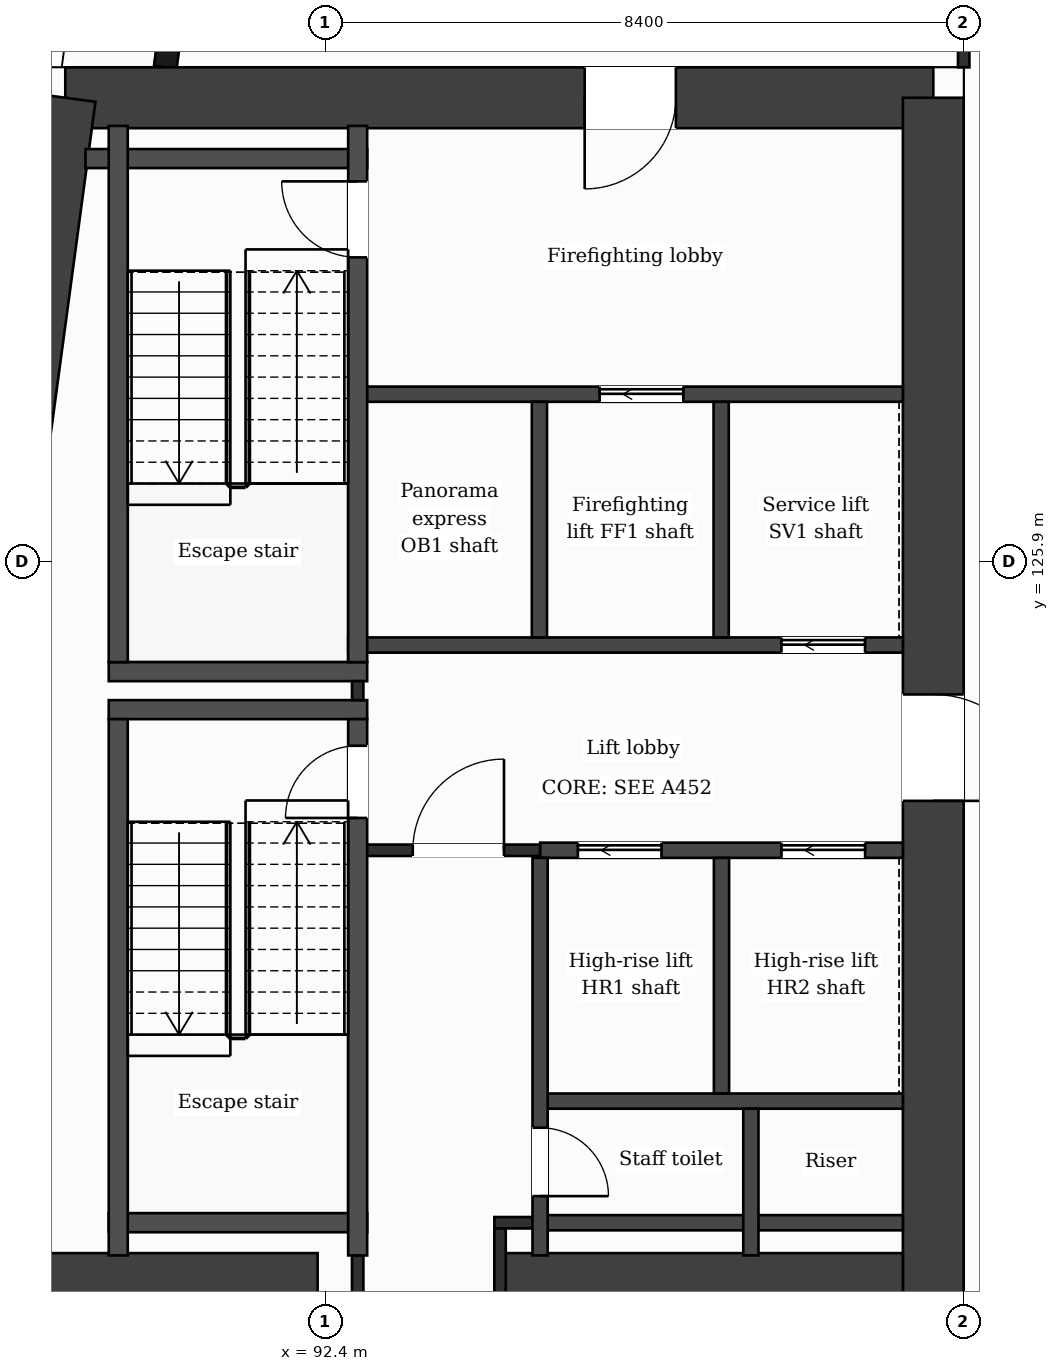
"""IFC4 building model, lengths in metres.
Left out: names, types, materials, properties, quantities, classifications, styles, units other than length and angle.
Written with IfcOpenShell. Run it as: python <this file> out.ifc"""

import sys

from ifc_helpers import new_model, si_unit, direction, frame, frame_2d, origin, place, context, subcontext, project, spatial, rectangle, extrude, element, fill, save


model = new_model("IFC4")
c1 = context("Model", 3, precision=1e-05, world=origin(), true_north=direction((0.0, 1.0)))
c2 = subcontext(c1, "Body", "Model", "MODEL_VIEW")
j1 = project(units=[si_unit("LENGTHUNIT", "METRE"), si_unit("PLANEANGLEUNIT", "RADIAN")], contexts=[c1])
p1 = place(None, origin())
s1 = spatial("IfcSite", under=j1, at=p1, CompositionType="ELEMENT")
p2 = place(p1, origin())
s2 = spatial("IfcBuilding", under=s1, at=p2, CompositionType="ELEMENT")
p3 = place(p2, frame((0.0, 0.0, 213.3)))
s3 = spatial("IfcBuildingStorey", under=s2, at=p3, CompositionType="ELEMENT", Elevation=213.3)
p4 = place(p3, frame((88.98, 132.0, 0.0), z_axis=(0.0, 0.0, 1.0), x_axis=(1.0, 0.0, 0.0)))
e1 = element("IfcWall", 1, at=p4, inside=s3, PredefinedType="SHEAR", context=c2, shape_type="SweptSolid", body=[
    extrude(rectangle(XDim=11.419, YDim=0.8, at=frame_2d((5.71, 0.0))), origin(), (0.0, 0.0, 1.0), 3.7),
])
p5 = place(p4, frame((6.833, 0.0, 0.0)))
e2 = element("IfcOpeningElement", 2, at=p5, cuts=e1, PredefinedType="OPENING", context=c2, shape_type="SweptSolid", body=[
    extrude(rectangle(XDim=1.2, YDim=2.1, at=frame_2d((0.6, 1.05))), frame((0.0, 0.41, 0.0), z_axis=(0.0, -1.0, 0.0), x_axis=(1.0, 0.0, 0.0)), (0.0, 0.0, 1.0), 0.82),
])
p6 = place(p3, frame((100.4, 132.0, 0.0), z_axis=(0.0, 0.0, 1.0), x_axis=(0.0, -1.0, 0.0)))
e3 = element("IfcWall", 3, at=p6, inside=s3, PredefinedType="SHEAR", context=c2, shape_type="SweptSolid", body=[
    extrude(rectangle(XDim=21.2, YDim=0.8, at=frame_2d((10.6, 0.0))), origin(), (0.0, 0.0, 1.0), 3.7),
])
p7 = place(p6, frame((7.85, 0.0, 0.0)))
e4 = element("IfcOpeningElement", 4, at=p7, cuts=e3, PredefinedType="OPENING", context=c2, shape_type="SweptSolid", body=[
    extrude(rectangle(XDim=1.4, YDim=2.1, at=frame_2d((0.7, 1.05))), frame((0.0, 0.41, 0.0), z_axis=(0.0, -1.0, 0.0), x_axis=(1.0, 0.0, 0.0)), (0.0, 0.0, 1.0), 0.82),
])
p8 = place(p3, frame((86.127, 110.8, 0.0), z_axis=(0.0, 0.0, 1.0), x_axis=(0.133408347329, 0.991061154956, 0.0)))
e5 = element("IfcWall", 5, at=p8, inside=s3, PredefinedType="SHEAR", context=c2, shape_type="SweptSolid", body=[
    extrude(rectangle(XDim=21.391, YDim=0.8, at=frame_2d((10.696, 0.0))), origin(), (0.0, 0.0, 1.0), 3.7),
])
p9 = place(p3, frame((87.223, 116.4, 0.0), z_axis=(0.0, 0.0, 1.0), x_axis=(1.0, 0.0, 0.0)))
e6 = element("IfcWall", 6, at=p9, inside=s3, PredefinedType="SHEAR", context=c2, shape_type="SweptSolid", body=[
    extrude(rectangle(XDim=5.077, YDim=0.8, at=frame_2d((2.539, 0.0))), origin(), (0.0, 0.0, 1.0), 3.7),
])
p10 = place(p3, frame((94.7, 116.4, 0.0), z_axis=(0.0, 0.0, 1.0), x_axis=(1.0, 0.0, 0.0)))
e7 = element("IfcWall", 7, at=p10, inside=s3, PredefinedType="SHEAR", context=c2, shape_type="SweptSolid", body=[
    extrude(rectangle(XDim=5.3, YDim=0.8, at=frame_2d((2.65, 0.0))), origin(), (0.0, 0.0, 1.0), 3.7),
])
p11 = place(p3, frame((91.177, 138.95, 0.0), z_axis=(0.0, 0.0, 1.0), x_axis=(-0.133426664613, -0.991058689065, 0.0)))
e8 = element("IfcWall", 8, at=p11, inside=s3, PredefinedType="SOLIDWALL", context=c2, shape_type="SweptSolid", body=[
    extrude(rectangle(XDim=6.609, YDim=0.3, at=frame_2d((3.305, 0.0))), origin(), (0.0, 0.0, 1.0), 3.38),
])
p12 = place(p11, frame((1.039, 0.0, 0.9)))
e9 = element("IfcOpeningElement", 9, at=p12, cuts=e8, PredefinedType="OPENING", context=c2, shape_type="SweptSolid", body=[
    extrude(rectangle(XDim=1.2, YDim=2.1, at=frame_2d((0.6, 1.05))), frame((0.0, 0.16, 0.0), z_axis=(0.0, -1.0, 0.0), x_axis=(1.0, 0.0, 0.0)), (0.0, 0.0, 1.0), 0.32),
])
p13 = place(p11, frame((4.294, 0.0, 0.0)))
e10 = element("IfcOpeningElement", 10, at=p13, cuts=e8, PredefinedType="OPENING", context=c2, shape_type="SweptSolid", body=[
    extrude(rectangle(XDim=1.2, YDim=2.4, at=frame_2d((0.6, 1.2))), frame((0.0, 0.16, 0.0), z_axis=(0.0, -1.0, 0.0), x_axis=(1.0, 0.0, 0.0)), (0.0, 0.0, 1.0), 0.32),
])
p14 = place(p3, frame((95.227, 117.2, 0.0), z_axis=(0.0, 0.0, 1.0), x_axis=(1.0, 0.0, 0.0)))
e11 = element("IfcWall", 11, at=p14, inside=s3, PredefinedType="PARTITIONING", context=c2, shape_type="SweptSolid", body=[
    extrude(rectangle(XDim=4.773, YDim=0.2, at=frame_2d((2.386, 0.0))), origin(), (0.0, 0.0, 1.0), 3.38),
])
p15 = place(p3, frame((94.625, 117.2, 0.0), z_axis=(0.0, 0.0, 1.0), x_axis=(1.0, 0.0, 0.0)))
e12 = element("IfcWall", 12, at=p15, inside=s3, PredefinedType="PARTITIONING", context=c2, shape_type="SweptSolid", body=[
    extrude(rectangle(XDim=0.602, YDim=0.15, at=frame_2d((0.301, 0.0))), origin(), (0.0, 0.0, 1.0), 3.38),
])
p16 = place(p3, frame((89.552, 117.2, 0.0), z_axis=(0.0, 0.0, 1.0), x_axis=(1.0, 0.0, 0.0)))
e13 = element("IfcWall", 13, at=p16, inside=s3, PredefinedType="PARTITIONING", context=c2, shape_type="SweptSolid", body=[
    extrude(rectangle(XDim=3.4, YDim=0.25, at=frame_2d((1.7, 0.0))), origin(), (0.0, 0.0, 1.0), 3.38),
])
p17 = place(p3, frame((95.227, 118.8, 0.0), z_axis=(0.0, 0.0, 1.0), x_axis=(1.0, 0.0, 0.0)))
e14 = element("IfcWall", 14, at=p17, inside=s3, PredefinedType="PARTITIONING", context=c2, shape_type="SweptSolid", body=[
    extrude(rectangle(XDim=4.773, YDim=0.2, at=frame_2d((2.386, 0.0))), origin(), (0.0, 0.0, 1.0), 3.38),
])
p18 = place(p3, frame((95.227, 122.1, 0.0), z_axis=(0.0, 0.0, 1.0), x_axis=(1.0, 0.0, 0.0)))
e15 = element("IfcWall", 15, at=p18, inside=s3, PredefinedType="PARTITIONING", context=c2, shape_type="SweptSolid", body=[
    extrude(rectangle(XDim=4.773, YDim=0.2, at=frame_2d((2.386, 0.0))), origin(), (0.0, 0.0, 1.0), 3.38),
])
p19 = place(p18, frame((0.497, 0.0, 0.0)))
e16 = element("IfcOpeningElement", 16, at=p19, cuts=e15, PredefinedType="OPENING", context=c2, shape_type="SweptSolid", body=[
    extrude(rectangle(XDim=1.1, YDim=2.1, at=frame_2d((0.55, 1.05))), frame((0.0, 0.11, 0.0), z_axis=(0.0, -1.0, 0.0), x_axis=(1.0, 0.0, 0.0)), (0.0, 0.0, 1.0), 0.22),
])
p20 = place(p18, frame((3.176, 0.0, 0.0)))
e17 = element("IfcOpeningElement", 17, at=p20, cuts=e15, PredefinedType="OPENING", context=c2, shape_type="SweptSolid", body=[
    extrude(rectangle(XDim=1.1, YDim=2.1, at=frame_2d((0.55, 1.05))), frame((0.0, 0.11, 0.0), z_axis=(0.0, -1.0, 0.0), x_axis=(1.0, 0.0, 0.0)), (0.0, 0.0, 1.0), 0.22),
])
p21 = place(p3, frame((92.827, 122.1, 0.0), z_axis=(0.0, 0.0, 1.0), x_axis=(1.0, 0.0, 0.0)))
e18 = element("IfcWall", 18, at=p21, inside=s3, PredefinedType="PARTITIONING", context=c2, shape_type="SweptSolid", body=[
    extrude(rectangle(XDim=2.4, YDim=0.15, at=frame_2d((1.2, 0.0))), origin(), (0.0, 0.0, 1.0), 3.38),
])
p22 = place(p21, frame((0.725, 0.0, 0.0)))
e19 = element("IfcOpeningElement", 19, at=p22, cuts=e18, PredefinedType="OPENING", context=c2, shape_type="SweptSolid", body=[
    extrude(rectangle(XDim=1.2, YDim=2.1, at=frame_2d((0.6, 1.05))), frame((0.0, 0.085, 0.0), z_axis=(0.0, -1.0, 0.0), x_axis=(1.0, 0.0, 0.0)), (0.0, 0.0, 1.0), 0.17),
])
for number, where, z_axis, x_axis in (
    (20, (89.552, 123.95, 0.0), (0.0, 0.0, 1.0), (1.0, 0.0, 0.0)),
    (21, (89.552, 124.45, 0.0), (0.0, 0.0, 1.0), (1.0, 0.0, 0.0)),
):
    element("IfcWall", number, at=place(p3, frame(where, z_axis=z_axis, x_axis=x_axis)), inside=s3, PredefinedType="PARTITIONING", context=c2, shape_type="SweptSolid", body=[
        extrude(rectangle(XDim=3.4, YDim=0.25, at=frame_2d((1.7, 0.0))), origin(), (0.0, 0.0, 1.0), 3.38),
    ])
p23 = place(p3, frame((92.702, 124.8, 0.0), z_axis=(0.0, 0.0, 1.0), x_axis=(1.0, 0.0, 0.0)))
e22 = element("IfcWall", 22, at=p23, inside=s3, PredefinedType="PARTITIONING", context=c2, shape_type="SweptSolid", body=[
    extrude(rectangle(XDim=7.298, YDim=0.2, at=frame_2d((3.649, 0.0))), origin(), (0.0, 0.0, 1.0), 3.38),
])
p24 = place(p23, frame((5.7, 0.0, 0.0)))
e23 = element("IfcOpeningElement", 23, at=p24, cuts=e22, PredefinedType="OPENING", context=c2, shape_type="SweptSolid", body=[
    extrude(rectangle(XDim=1.1, YDim=2.1, at=frame_2d((0.55, 1.05))), frame((0.0, 0.11, 0.0), z_axis=(0.0, -1.0, 0.0), x_axis=(1.0, 0.0, 0.0)), (0.0, 0.0, 1.0), 0.22),
])
p25 = place(p3, frame((92.827, 128.1, 0.0), z_axis=(0.0, 0.0, 1.0), x_axis=(1.0, 0.0, 0.0)))
e24 = element("IfcWall", 24, at=p25, inside=s3, PredefinedType="PARTITIONING", context=c2, shape_type="SweptSolid", body=[
    extrude(rectangle(XDim=7.173, YDim=0.2, at=frame_2d((3.586, 0.0))), origin(), (0.0, 0.0, 1.0), 3.38),
])
p26 = place(p25, frame((3.184, 0.0, 0.0)))
e25 = element("IfcOpeningElement", 25, at=p26, cuts=e24, PredefinedType="OPENING", context=c2, shape_type="SweptSolid", body=[
    extrude(rectangle(XDim=1.1, YDim=2.1, at=frame_2d((0.55, 1.05))), frame((0.0, 0.11, 0.0), z_axis=(0.0, -1.0, 0.0), x_axis=(1.0, 0.0, 0.0)), (0.0, 0.0, 1.0), 0.22),
])
p27 = place(p3, frame((89.246, 131.2, 0.0), z_axis=(0.0, 0.0, 1.0), x_axis=(1.0, 0.0, 0.0)))
e26 = element("IfcWall", 26, at=p27, inside=s3, PredefinedType="PARTITIONING", context=c2, shape_type="SweptSolid", body=[
    extrude(rectangle(XDim=3.706, YDim=0.25, at=frame_2d((1.853, 0.0))), origin(), (0.0, 0.0, 1.0), 3.38),
])
for number, where, z_axis, x_axis in (
    (27, (89.677, 116.77, 0.0), (0.0, 0.0, 1.0), (0.0, 1.0, 0.0)),
    (28, (89.677, 124.575, 0.0), (0.0, 0.0, 1.0), (0.0, 1.0, 0.0)),
):
    element("IfcWall", number, at=place(p3, frame(where, z_axis=z_axis, x_axis=x_axis)), inside=s3, PredefinedType="PARTITIONING", context=c2, shape_type="SweptSolid", body=[
        extrude(rectangle(XDim=7.055, YDim=0.25, at=frame_2d((3.527, 0.0))), origin(), (0.0, 0.0, 1.0), 3.38),
    ])
p28 = place(p3, frame((92.827, 116.0, 0.0), z_axis=(0.0, 0.0, 1.0), x_axis=(0.0, 1.0, 0.0)))
e29 = element("IfcWall", 29, at=p28, inside=s3, PredefinedType="PARTITIONING", context=c2, shape_type="SweptSolid", body=[
    extrude(rectangle(XDim=0.77, YDim=0.15, at=frame_2d((0.385, 0.0))), origin(), (0.0, 0.0, 1.0), 3.38),
])
p29 = place(p3, frame((92.827, 124.075, 0.0), z_axis=(0.0, 0.0, 1.0), x_axis=(0.0, 1.0, 0.0)))
e30 = element("IfcWall", 30, at=p29, inside=s3, PredefinedType="PARTITIONING", context=c2, shape_type="SweptSolid", body=[
    extrude(rectangle(XDim=0.25, YDim=0.15, at=frame_2d((0.125, 0.0))), origin(), (0.0, 0.0, 1.0), 3.38),
])
p30 = place(p3, frame((92.827, 116.77, 0.0), z_axis=(0.0, 0.0, 1.0), x_axis=(0.0, 1.0, 0.0)))
e31 = element("IfcWall", 31, at=p30, inside=s3, PredefinedType="PARTITIONING", context=c2, shape_type="SweptSolid", body=[
    extrude(rectangle(XDim=7.055, YDim=0.25, at=frame_2d((3.527, 0.0))), origin(), (0.0, 0.0, 1.0), 3.38),
])
p31 = place(p30, frame((5.755, 0.0, 0.0)))
e32 = element("IfcOpeningElement", 32, at=p31, cuts=e31, PredefinedType="OPENING", context=c2, shape_type="SweptSolid", body=[
    extrude(rectangle(XDim=0.95, YDim=2.1, at=frame_2d((0.475, 1.05))), frame((0.0, 0.135, 0.0), z_axis=(0.0, -1.0, 0.0), x_axis=(1.0, 0.0, 0.0)), (0.0, 0.0, 1.0), 0.27),
])
p32 = place(p3, frame((92.827, 124.575, 0.0), z_axis=(0.0, 0.0, 1.0), x_axis=(0.0, 1.0, 0.0)))
e33 = element("IfcWall", 33, at=p32, inside=s3, PredefinedType="PARTITIONING", context=c2, shape_type="SweptSolid", body=[
    extrude(rectangle(XDim=7.055, YDim=0.25, at=frame_2d((3.527, 0.0))), origin(), (0.0, 0.0, 1.0), 3.38),
])
p33 = place(p32, frame((5.325, 0.0, 0.0)))
e34 = element("IfcOpeningElement", 34, at=p33, cuts=e33, PredefinedType="OPENING", context=c2, shape_type="SweptSolid", body=[
    extrude(rectangle(XDim=1.0, YDim=2.1, at=frame_2d((0.5, 1.05))), frame((0.0, 0.135, 0.0), z_axis=(0.0, -1.0, 0.0), x_axis=(1.0, 0.0, 0.0)), (0.0, 0.0, 1.0), 0.27),
])
p34 = place(p3, frame((94.7, 116.0, 0.0), z_axis=(0.0, 0.0, 1.0), x_axis=(0.0, 1.0, 0.0)))
e35 = element("IfcWall", 35, at=p34, inside=s3, PredefinedType="PARTITIONING", context=c2, shape_type="SweptSolid", body=[
    extrude(rectangle(XDim=1.125, YDim=0.15, at=frame_2d((0.562, 0.0))), origin(), (0.0, 0.0, 1.0), 3.38),
])
p35 = place(p3, frame((95.218, 124.9, 0.0), z_axis=(0.0, 0.0, 1.0), x_axis=(0.0, 1.0, 0.0)))
e36 = element("IfcWall", 36, at=p35, inside=s3, PredefinedType="PARTITIONING", context=c2, shape_type="SweptSolid", body=[
    extrude(rectangle(XDim=3.1, YDim=0.2, at=frame_2d((1.55, 0.0))), origin(), (0.0, 0.0, 1.0), 3.38),
])
p36 = place(p3, frame((95.227, 116.77, 0.0), z_axis=(0.0, 0.0, 1.0), x_axis=(0.0, 1.0, 0.0)))
e37 = element("IfcWall", 37, at=p36, inside=s3, PredefinedType="PARTITIONING", context=c2, shape_type="SweptSolid", body=[
    extrude(rectangle(XDim=5.23, YDim=0.2, at=frame_2d((2.615, 0.0))), origin(), (0.0, 0.0, 1.0), 3.38),
])
p37 = place(p36, frame((0.78, 0.0, 0.0)))
e38 = element("IfcOpeningElement", 38, at=p37, cuts=e37, PredefinedType="OPENING", context=c2, shape_type="SweptSolid", body=[
    extrude(rectangle(XDim=0.9, YDim=2.1, at=frame_2d((0.45, 1.05))), frame((0.0, 0.11, 0.0), z_axis=(0.0, -1.0, 0.0), x_axis=(1.0, 0.0, 0.0)), (0.0, 0.0, 1.0), 0.22),
])
for number, where, z_axis, x_axis in (
    (39, (97.609, 124.9, 0.0), (0.0, 0.0, 1.0), (0.0, 1.0, 0.0)),
    (40, (97.614, 118.9, 0.0), (0.0, 0.0, 1.0), (0.0, 1.0, 0.0)),
):
    element("IfcWall", number, at=place(p3, frame(where, z_axis=z_axis, x_axis=x_axis)), inside=s3, PredefinedType="PARTITIONING", context=c2, shape_type="SweptSolid", body=[
        extrude(rectangle(XDim=3.1, YDim=0.2, at=frame_2d((1.55, 0.0))), origin(), (0.0, 0.0, 1.0), 3.38),
    ])
p38 = place(p3, frame((98.0, 116.77, 0.0), z_axis=(0.0, 0.0, 1.0), x_axis=(0.0, 1.0, 0.0)))
e41 = element("IfcWall", 41, at=p38, inside=s3, PredefinedType="PARTITIONING", context=c2, shape_type="SweptSolid", body=[
    extrude(rectangle(XDim=1.93, YDim=0.2, at=frame_2d((0.965, 0.0))), origin(), (0.0, 0.0, 1.0), 3.38),
])
p39 = place(p3, frame((100.8, 132.4, 0.0), z_axis=(0.0, 0.0, 1.0), x_axis=(0.0, 1.0, 0.0)))
e42 = element("IfcWall", 42, at=p39, inside=s3, PredefinedType="PARTITIONING", context=c2, shape_type="SweptSolid", body=[
    extrude(rectangle(XDim=1.325, YDim=0.15, at=frame_2d((0.663, 0.0))), origin(), (0.0, 0.0, 1.0), 3.38),
])
p40 = place(p22, origin())
e43 = element("IfcDoor", 43, at=p40, inside=s3, OperationType="SINGLE_SWING_RIGHT", PredefinedType="DOOR", context=c2, shape_type="SweptSolid", body=[
    extrude(rectangle(XDim=1.2, YDim=2.1, at=frame_2d((0.6, 1.05))), frame((0.0, 0.025, 0.0), z_axis=(0.0, -1.0, 0.0), x_axis=(1.0, 0.0, 0.0)), (0.0, 0.0, 1.0), 0.05),
])
fill(e19, e43)
p41 = place(p19, origin())
e44 = element("IfcDoor", 44, at=p41, inside=s3, OperationType="SLIDING_TO_LEFT", PredefinedType="DOOR", context=c2, shape_type="SweptSolid", body=[
    extrude(rectangle(XDim=1.1, YDim=2.1, at=frame_2d((0.55, 1.05))), frame((0.0, 0.025, 0.0), z_axis=(0.0, -1.0, 0.0), x_axis=(1.0, 0.0, 0.0)), (0.0, 0.0, 1.0), 0.05),
])
fill(e16, e44)
p42 = place(p20, origin())
e45 = element("IfcDoor", 45, at=p42, inside=s3, OperationType="SLIDING_TO_LEFT", PredefinedType="DOOR", context=c2, shape_type="SweptSolid", body=[
    extrude(rectangle(XDim=1.1, YDim=2.1, at=frame_2d((0.55, 1.05))), frame((0.0, 0.025, 0.0), z_axis=(0.0, -1.0, 0.0), x_axis=(1.0, 0.0, 0.0)), (0.0, 0.0, 1.0), 0.05),
])
fill(e17, e45)
p43 = place(p26, origin())
e46 = element("IfcDoor", 46, at=p43, inside=s3, OperationType="SLIDING_TO_LEFT", PredefinedType="DOOR", context=c2, shape_type="SweptSolid", body=[
    extrude(rectangle(XDim=1.1, YDim=2.1, at=frame_2d((0.55, 1.05))), frame((0.0, 0.025, 0.0), z_axis=(0.0, -1.0, 0.0), x_axis=(1.0, 0.0, 0.0)), (0.0, 0.0, 1.0), 0.05),
])
fill(e25, e46)
p44 = place(p24, origin())
e47 = element("IfcDoor", 47, at=p44, inside=s3, OperationType="SLIDING_TO_LEFT", PredefinedType="DOOR", context=c2, shape_type="SweptSolid", body=[
    extrude(rectangle(XDim=1.1, YDim=2.1, at=frame_2d((0.55, 1.05))), frame((0.0, 0.025, 0.0), z_axis=(0.0, -1.0, 0.0), x_axis=(1.0, 0.0, 0.0)), (0.0, 0.0, 1.0), 0.05),
])
fill(e23, e47)
p45 = place(p31, origin())
e48 = element("IfcDoor", 48, at=p45, inside=s3, OperationType="SINGLE_SWING_LEFT", PredefinedType="DOOR", context=c2, shape_type="SweptSolid", body=[
    extrude(rectangle(XDim=0.95, YDim=2.1, at=frame_2d((0.475, 1.05))), frame((0.0, 0.025, 0.0), z_axis=(0.0, -1.0, 0.0), x_axis=(1.0, 0.0, 0.0)), (0.0, 0.0, 1.0), 0.05),
])
fill(e32, e48)
p46 = place(p33, origin())
e49 = element("IfcDoor", 49, at=p46, inside=s3, OperationType="SINGLE_SWING_RIGHT", PredefinedType="DOOR", context=c2, shape_type="SweptSolid", body=[
    extrude(rectangle(XDim=1.0, YDim=2.1, at=frame_2d((0.5, 1.05))), frame((0.0, 0.025, 0.0), z_axis=(0.0, -1.0, 0.0), x_axis=(1.0, 0.0, 0.0)), (0.0, 0.0, 1.0), 0.05),
])
fill(e34, e49)
p47 = place(p37, origin())
e50 = element("IfcDoor", 50, at=p47, inside=s3, OperationType="SINGLE_SWING_LEFT", PredefinedType="DOOR", context=c2, shape_type="SweptSolid", body=[
    extrude(rectangle(XDim=0.9, YDim=2.1, at=frame_2d((0.45, 1.05))), frame((0.0, 0.025, 0.0), z_axis=(0.0, -1.0, 0.0), x_axis=(1.0, 0.0, 0.0)), (0.0, 0.0, 1.0), 0.05),
])
fill(e38, e50)
p48 = place(p5, origin())
e51 = element("IfcDoor", 51, at=p48, inside=s3, OperationType="SINGLE_SWING_LEFT", PredefinedType="DOOR", context=c2, shape_type="SweptSolid", body=[
    extrude(rectangle(XDim=1.2, YDim=2.1, at=frame_2d((0.6, 1.05))), frame((0.0, 0.025, 0.0), z_axis=(0.0, -1.0, 0.0), x_axis=(1.0, 0.0, 0.0)), (0.0, 0.0, 1.0), 0.05),
])
fill(e2, e51)
p49 = place(p7, origin())
e52 = element("IfcDoor", 52, at=p49, inside=s3, OperationType="SINGLE_SWING_RIGHT", PredefinedType="DOOR", context=c2, shape_type="SweptSolid", body=[
    extrude(rectangle(XDim=1.4, YDim=2.1, at=frame_2d((0.7, 1.05))), frame((0.0, 0.025, 0.0), z_axis=(0.0, -1.0, 0.0), x_axis=(1.0, 0.0, 0.0)), (0.0, 0.0, 1.0), 0.05),
])
fill(e4, e52)
save(model, sys.argv[1])
